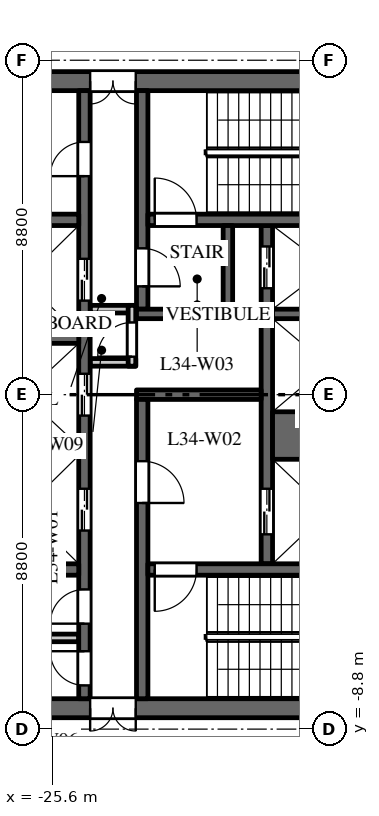
"""IFC4 building model, lengths in metres.
Left out: names, types, materials, properties, quantities, classifications, styles, units other than length and angle.
Written with IfcOpenShell. Run it as: python <this file> out.ifc"""

import sys

from ifc_helpers import new_model, si_unit, direction, frame, frame_2d, origin, place, context, subcontext, project, spatial, rectangle, extrude, element, fill, save


model = new_model("IFC4")
c1 = context("Model", 3, precision=1e-05, world=origin(), true_north=direction((0.0, 1.0)))
c2 = subcontext(c1, "Body", "Model", "MODEL_VIEW")
j1 = project(units=[si_unit("LENGTHUNIT", "METRE"), si_unit("PLANEANGLEUNIT", "RADIAN")], contexts=[c1])
p1 = place(None, origin())
s1 = spatial("IfcSite", under=j1, at=p1, CompositionType="ELEMENT")
p2 = place(p1, origin())
s2 = spatial("IfcBuilding", under=s1, at=p2, CompositionType="ELEMENT")
p3 = place(p2, frame((0.0, 0.0, 150.0)))
s3 = spatial("IfcBuildingStorey", under=s2, at=p3, CompositionType="ELEMENT", Elevation=150.0)
p4 = place(p3, frame((-16.5, 8.25, 0.0), z_axis=(0.0, 0.0, 1.0), x_axis=(-1.0, 0.0, 0.0)))
e1 = element("IfcWall", 1, at=p4, inside=s3, PredefinedType="SHEAR", context=c2, shape_type="SweptSolid", body=[
    extrude(rectangle(XDim=15.0, YDim=0.5, at=frame_2d((7.5, 0.0))), origin(), (0.0, 0.0, 1.0), 3.7),
])
p5 = place(p4, frame((6.9, 0.0, 0.0)))
e2 = element("IfcOpeningElement", 2, at=p5, cuts=e1, PredefinedType="OPENING", context=c2, shape_type="SweptSolid", body=[
    extrude(rectangle(XDim=1.2, YDim=2.1, at=frame_2d((0.6, 1.05))), frame((0.0, 0.26, 0.0), z_axis=(0.0, -1.0, 0.0), x_axis=(1.0, 0.0, 0.0)), (0.0, 0.0, 1.0), 0.52),
])
p6 = place(p4, frame((12.425, 0.0, 0.0)))
e3 = element("IfcOpeningElement", 3, at=p6, cuts=e1, PredefinedType="OPENING", context=c2, shape_type="SweptSolid", body=[
    extrude(rectangle(XDim=0.9, YDim=2.1, at=frame_2d((0.45, 1.05))), frame((0.0, 0.26, 0.0), z_axis=(0.0, -1.0, 0.0), x_axis=(1.0, 0.0, 0.0)), (0.0, 0.0, 1.0), 0.52),
])
p7 = place(p3, frame((-16.5, -8.25, 0.0), z_axis=(0.0, 0.0, 1.0), x_axis=(-1.0, 0.0, 0.0)))
e4 = element("IfcWall", 4, at=p7, inside=s3, PredefinedType="SHEAR", context=c2, shape_type="SweptSolid", body=[
    extrude(rectangle(XDim=15.0, YDim=0.5, at=frame_2d((7.5, 0.0))), origin(), (0.0, 0.0, 1.0), 3.7),
])
p8 = place(p7, frame((6.9, 0.0, 0.0)))
e5 = element("IfcOpeningElement", 5, at=p8, cuts=e4, PredefinedType="OPENING", context=c2, shape_type="SweptSolid", body=[
    extrude(rectangle(XDim=1.2, YDim=2.1, at=frame_2d((0.6, 1.05))), frame((0.0, 0.26, 0.0), z_axis=(0.0, -1.0, 0.0), x_axis=(1.0, 0.0, 0.0)), (0.0, 0.0, 1.0), 0.52),
])
p9 = place(p7, frame((12.275, 0.0, 0.0)))
e6 = element("IfcOpeningElement", 6, at=p9, cuts=e4, PredefinedType="OPENING", context=c2, shape_type="SweptSolid", body=[
    extrude(rectangle(XDim=0.9, YDim=2.1, at=frame_2d((0.45, 1.05))), frame((0.0, 0.26, 0.0), z_axis=(0.0, -1.0, 0.0), x_axis=(1.0, 0.0, 0.0)), (0.0, 0.0, 1.0), 0.52),
])
p10 = place(p3, frame((-19.95, -4.45, 0.0), z_axis=(0.0, 0.0, 1.0), x_axis=(0.0, 1.0, 0.0)))
e7 = element("IfcWall", 7, at=p10, inside=s3, PredefinedType="SHEAR", context=c2, shape_type="SweptSolid", body=[
    extrude(rectangle(XDim=8.9, YDim=0.3, at=frame_2d((4.45, 0.0))), origin(), (0.0, 0.0, 1.0), 3.7),
])
p11 = place(p10, frame((0.775, 0.0, 0.0)))
e8 = element("IfcOpeningElement", 8, at=p11, cuts=e7, PredefinedType="OPENING", context=c2, shape_type="SweptSolid", body=[
    extrude(rectangle(XDim=1.2, YDim=2.1, at=frame_2d((0.6, 1.05))), frame((0.0, 0.16, 0.0), z_axis=(0.0, -1.0, 0.0), x_axis=(1.0, 0.0, 0.0)), (0.0, 0.0, 1.0), 0.32),
])
p12 = place(p10, frame((7.25, 0.0, 0.0)))
e9 = element("IfcOpeningElement", 9, at=p12, cuts=e7, PredefinedType="OPENING", context=c2, shape_type="SweptSolid", body=[
    extrude(rectangle(XDim=1.1, YDim=2.1, at=frame_2d((0.55, 1.05))), frame((0.0, 0.16, 0.0), z_axis=(0.0, -1.0, 0.0), x_axis=(1.0, 0.0, 0.0)), (0.0, 0.0, 1.0), 0.32),
])
p13 = place(p3, frame((-24.75, -8.0, 0.0), z_axis=(0.0, 0.0, 1.0), x_axis=(0.0, 1.0, 0.0)))
e10 = element("IfcWall", 10, at=p13, inside=s3, PredefinedType="SHEAR", context=c2, shape_type="SweptSolid", body=[
    extrude(rectangle(XDim=16.0, YDim=0.3, at=frame_2d((8.0, 0.0))), origin(), (0.0, 0.0, 1.0), 3.7),
])
p14 = place(p13, frame((4.425, 0.0, 0.0)))
e11 = element("IfcOpeningElement", 11, at=p14, cuts=e10, PredefinedType="OPENING", context=c2, shape_type="SweptSolid", body=[
    extrude(rectangle(XDim=1.1, YDim=2.1, at=frame_2d((0.55, 1.05))), frame((0.0, 0.16, 0.0), z_axis=(0.0, -1.0, 0.0), x_axis=(1.0, 0.0, 0.0)), (0.0, 0.0, 1.0), 0.32),
])
p15 = place(p13, frame((7.45, 0.0, 0.0)))
e12 = element("IfcOpeningElement", 12, at=p15, cuts=e10, PredefinedType="OPENING", context=c2, shape_type="SweptSolid", body=[
    extrude(rectangle(XDim=1.1, YDim=2.1, at=frame_2d((0.55, 1.05))), frame((0.0, 0.16, 0.0), z_axis=(0.0, -1.0, 0.0), x_axis=(1.0, 0.0, 0.0)), (0.0, 0.0, 1.0), 0.32),
])
p16 = place(p13, frame((10.475, 0.0, 0.0)))
e13 = element("IfcOpeningElement", 13, at=p16, cuts=e10, PredefinedType="OPENING", context=c2, shape_type="SweptSolid", body=[
    extrude(rectangle(XDim=1.1, YDim=2.1, at=frame_2d((0.55, 1.05))), frame((0.0, 0.16, 0.0), z_axis=(0.0, -1.0, 0.0), x_axis=(1.0, 0.0, 0.0)), (0.0, 0.0, 1.0), 0.32),
])
p17 = place(p13, frame((13.75, 0.0, 0.0)))
e14 = element("IfcOpeningElement", 14, at=p17, cuts=e10, PredefinedType="OPENING", context=c2, shape_type="SweptSolid", body=[
    extrude(rectangle(XDim=0.9, YDim=2.1, at=frame_2d((0.45, 1.05))), frame((0.0, 0.16, 0.0), z_axis=(0.0, -1.0, 0.0), x_axis=(1.0, 0.0, 0.0)), (0.0, 0.0, 1.0), 0.32),
])
p18 = place(p13, frame((1.975, 0.0, 0.0)))
e15 = element("IfcOpeningElement", 15, at=p18, cuts=e10, PredefinedType="OPENING", context=c2, shape_type="SweptSolid", body=[
    extrude(rectangle(XDim=0.9, YDim=2.1, at=frame_2d((0.45, 1.05))), frame((0.0, 0.16, 0.0), z_axis=(0.0, -1.0, 0.0), x_axis=(1.0, 0.0, 0.0)), (0.0, 0.0, 1.0), 0.32),
])
p19 = place(p13, frame((0.35, 0.0, 0.0)))
e16 = element("IfcOpeningElement", 16, at=p19, cuts=e10, PredefinedType="OPENING", context=c2, shape_type="SweptSolid", body=[
    extrude(rectangle(XDim=0.9, YDim=2.1, at=frame_2d((0.45, 1.05))), frame((0.0, 0.16, 0.0), z_axis=(0.0, -1.0, 0.0), x_axis=(1.0, 0.0, 0.0)), (0.0, 0.0, 1.0), 0.32),
])
p20 = place(p3, frame((-20.1, 0.0, 0.0), z_axis=(0.0, 0.0, 1.0), x_axis=(-1.0, 0.0, 0.0)))
e17 = element("IfcWall", 17, at=p20, inside=s3, PredefinedType="SHEAR", context=c2, shape_type="SweptSolid", body=[
    extrude(rectangle(XDim=3.28, YDim=0.25, at=frame_2d((1.64, 0.0))), origin(), (0.0, 0.0, 1.0), 3.7),
])
for number, where, z_axis, x_axis in (
    (18, (-23.4, 0.85, 0.0), (0.0, 0.0, 1.0), (-1.0, 0.0, 0.0)),
    (19, (-23.4, 2.25, 0.0), (0.0, 0.0, 1.0), (-1.0, 0.0, 0.0)),
):
    element("IfcWall", number, at=place(p3, frame(where, z_axis=z_axis, x_axis=x_axis)), inside=s3, PredefinedType="PARTITIONING", context=c2, shape_type="SweptSolid", body=[
        extrude(rectangle(XDim=1.2, YDim=0.2, at=frame_2d((0.6, 0.0))), origin(), (0.0, 0.0, 1.0), 3.7),
    ])
p21 = place(p3, frame((-23.5, 0.75, 0.0), z_axis=(0.0, 0.0, 1.0), x_axis=(0.0, 1.0, 0.0)))
e20 = element("IfcWall", 20, at=p21, inside=s3, PredefinedType="PARTITIONING", context=c2, shape_type="SweptSolid", body=[
    extrude(rectangle(XDim=1.6, YDim=0.2, at=frame_2d((0.8, 0.0))), origin(), (0.0, 0.0, 1.0), 3.7),
])
p22 = place(p21, frame((0.25, 0.0, 0.0)))
e21 = element("IfcOpeningElement", 21, at=p22, cuts=e20, PredefinedType="OPENING", context=c2, shape_type="SweptSolid", body=[
    extrude(rectangle(XDim=0.9, YDim=2.1, at=frame_2d((0.45, 1.05))), frame((0.0, 0.11, 0.0), z_axis=(0.0, -1.0, 0.0), x_axis=(1.0, 0.0, 0.0)), (0.0, 0.0, 1.0), 0.22),
])
p23 = place(p3, frame((-24.9, 4.6, 0.0), z_axis=(0.0, 0.0, 1.0), x_axis=(-1.0, 0.0, 0.0)))
e22 = element("IfcWall", 22, at=p23, inside=s3, PredefinedType="SHEAR", context=c2, shape_type="SweptSolid", body=[
    extrude(rectangle(XDim=6.1, YDim=0.3, at=frame_2d((3.05, 0.0))), origin(), (0.0, 0.0, 1.0), 3.7),
])
p24 = place(p23, frame((4.2, 0.0, 0.0)))
e23 = element("IfcOpeningElement", 23, at=p24, cuts=e22, PredefinedType="OPENING", context=c2, shape_type="SweptSolid", body=[
    extrude(rectangle(XDim=0.9, YDim=2.1, at=frame_2d((0.45, 1.05))), frame((0.0, 0.16, 0.0), z_axis=(0.0, -1.0, 0.0), x_axis=(1.0, 0.0, 0.0)), (0.0, 0.0, 1.0), 0.32),
])
p25 = place(p3, frame((-24.9, -6.4, 0.0), z_axis=(0.0, 0.0, 1.0), x_axis=(-1.0, 0.0, 0.0)))
e24 = element("IfcWall", 24, at=p25, inside=s3, PredefinedType="PARTITIONING", context=c2, shape_type="SweptSolid", body=[
    extrude(rectangle(XDim=2.35, YDim=0.2, at=frame_2d((1.175, 0.0))), origin(), (0.0, 0.0, 1.0), 3.7),
])
p26 = place(p3, frame((-24.9, -4.6, 0.0), z_axis=(0.0, 0.0, 1.0), x_axis=(-1.0, 0.0, 0.0)))
e25 = element("IfcWall", 25, at=p26, inside=s3, PredefinedType="SHEAR", context=c2, shape_type="SweptSolid", body=[
    extrude(rectangle(XDim=6.1, YDim=0.3, at=frame_2d((3.05, 0.0))), origin(), (0.0, 0.0, 1.0), 3.7),
])
p27 = place(p3, frame((-16.9, -1.075, 0.0), z_axis=(0.0, 0.0, 1.0), x_axis=(-1.0, 0.0, 0.0)))
e26 = element("IfcWall", 26, at=p27, inside=s3, PredefinedType="SHEAR", context=c2, shape_type="SweptSolid", body=[
    extrude(rectangle(XDim=2.9, YDim=1.25, at=frame_2d((1.45, 0.0))), origin(), (0.0, 0.0, 1.0), 3.7),
])
for number, where, z_axis, x_axis in (
    (27, (-16.9, 2.125, 0.0), (0.0, 0.0, 1.0), (-1.0, 0.0, 0.0)),
    (28, (-24.9, -1.475, 0.0), (0.0, 0.0, 1.0), (-1.0, 0.0, 0.0)),
    (29, (-24.9, 1.475, 0.0), (0.0, 0.0, 1.0), (-1.0, 0.0, 0.0)),
):
    element("IfcWall", number, at=place(p3, frame(where, z_axis=z_axis, x_axis=x_axis)), inside=s3, PredefinedType="SHEAR", context=c2, shape_type="SweptSolid", body=[
        extrude(rectangle(XDim=2.9, YDim=0.25, at=frame_2d((1.45, 0.0))), origin(), (0.0, 0.0, 1.0), 3.7),
    ])
p28 = place(p3, frame((-23.23, 2.25, 0.0), z_axis=(0.0, 0.0, 1.0), x_axis=(0.0, 1.0, 0.0)))
e30 = element("IfcWall", 30, at=p28, inside=s3, PredefinedType="SHEAR", context=c2, shape_type="SweptSolid", body=[
    extrude(rectangle(XDim=5.75, YDim=0.3, at=frame_2d((2.875, 0.0))), origin(), (0.0, 0.0, 1.0), 3.7),
])
p29 = place(p28, frame((0.6, 0.0, 0.0)))
e31 = element("IfcOpeningElement", 31, at=p29, cuts=e30, PredefinedType="OPENING", context=c2, shape_type="SweptSolid", body=[
    extrude(rectangle(XDim=1.0, YDim=2.1, at=frame_2d((0.5, 1.05))), frame((0.0, 0.16, 0.0), z_axis=(0.0, -1.0, 0.0), x_axis=(1.0, 0.0, 0.0)), (0.0, 0.0, 1.0), 0.32),
])
p30 = place(p3, frame((-23.23, -8.0, 0.0), z_axis=(0.0, 0.0, 1.0), x_axis=(0.0, 1.0, 0.0)))
e32 = element("IfcWall", 32, at=p30, inside=s3, PredefinedType="SHEAR", context=c2, shape_type="SweptSolid", body=[
    extrude(rectangle(XDim=7.875, YDim=0.3, at=frame_2d((3.938, 0.0))), origin(), (0.0, 0.0, 1.0), 3.7),
])
p31 = place(p30, frame((5.15, 0.0, 0.0)))
e33 = element("IfcOpeningElement", 33, at=p31, cuts=e32, PredefinedType="OPENING", context=c2, shape_type="SweptSolid", body=[
    extrude(rectangle(XDim=1.1, YDim=2.1, at=frame_2d((0.55, 1.05))), frame((0.0, 0.16, 0.0), z_axis=(0.0, -1.0, 0.0), x_axis=(1.0, 0.0, 0.0)), (0.0, 0.0, 1.0), 0.32),
])
p32 = place(p3, frame((-16.9, 4.6, 0.0), z_axis=(0.0, 0.0, 1.0), x_axis=(-1.0, 0.0, 0.0)))
e34 = element("IfcWall", 34, at=p32, inside=s3, PredefinedType="SHEAR", context=c2, shape_type="SweptSolid", body=[
    extrude(rectangle(XDim=6.18, YDim=0.3, at=frame_2d((3.09, 0.0))), origin(), (0.0, 0.0, 1.0), 3.7),
])
p33 = place(p32, frame((4.9, 0.0, 0.0)))
e35 = element("IfcOpeningElement", 35, at=p33, cuts=e34, PredefinedType="OPENING", context=c2, shape_type="SweptSolid", body=[
    extrude(rectangle(XDim=1.1, YDim=2.1, at=frame_2d((0.55, 1.05))), frame((0.0, 0.16, 0.0), z_axis=(0.0, -1.0, 0.0), x_axis=(1.0, 0.0, 0.0)), (0.0, 0.0, 1.0), 0.32),
])
p34 = place(p3, frame((-16.9, -4.6, 0.0), z_axis=(0.0, 0.0, 1.0), x_axis=(-1.0, 0.0, 0.0)))
e36 = element("IfcWall", 36, at=p34, inside=s3, PredefinedType="SHEAR", context=c2, shape_type="SweptSolid", body=[
    extrude(rectangle(XDim=6.18, YDim=0.3, at=frame_2d((3.09, 0.0))), origin(), (0.0, 0.0, 1.0), 3.7),
])
p35 = place(p34, frame((4.9, 0.0, 0.0)))
e37 = element("IfcOpeningElement", 37, at=p35, cuts=e36, PredefinedType="OPENING", context=c2, shape_type="SweptSolid", body=[
    extrude(rectangle(XDim=1.1, YDim=2.1, at=frame_2d((0.55, 1.05))), frame((0.0, 0.16, 0.0), z_axis=(0.0, -1.0, 0.0), x_axis=(1.0, 0.0, 0.0)), (0.0, 0.0, 1.0), 0.32),
])
p36 = place(p3, frame((-20.85, 2.125, 0.0), z_axis=(0.0, 0.0, 1.0), x_axis=(-1.0, 0.0, 0.0)))
e38 = element("IfcWall", 38, at=p36, inside=s3, PredefinedType="SHEAR", context=c2, shape_type="SweptSolid", body=[
    extrude(rectangle(XDim=2.53, YDim=0.25, at=frame_2d((1.265, 0.0))), origin(), (0.0, 0.0, 1.0), 3.7),
])
p37 = place(p3, frame((-20.975, 2.25, 0.0), z_axis=(0.0, 0.0, 1.0), x_axis=(0.0, 1.0, 0.0)))
e39 = element("IfcWall", 39, at=p37, inside=s3, PredefinedType="SHEAR", context=c2, shape_type="SweptSolid", body=[
    extrude(rectangle(XDim=2.2, YDim=0.25, at=frame_2d((1.1, 0.0))), origin(), (0.0, 0.0, 1.0), 3.7),
])
p38 = place(p11, origin())
e40 = element("IfcDoor", 40, at=p38, inside=s3, OperationType="DOUBLE_DOOR_SLIDING", PredefinedType="DOOR", context=c2, shape_type="SweptSolid", body=[
    extrude(rectangle(XDim=1.2, YDim=2.1, at=frame_2d((0.6, 1.05))), frame((0.0, 0.025, 0.0), z_axis=(0.0, -1.0, 0.0), x_axis=(1.0, 0.0, 0.0)), (0.0, 0.0, 1.0), 0.05),
])
fill(e8, e40)
p39 = place(p12, origin())
e41 = element("IfcDoor", 41, at=p39, inside=s3, OperationType="DOUBLE_DOOR_SLIDING", PredefinedType="DOOR", context=c2, shape_type="SweptSolid", body=[
    extrude(rectangle(XDim=1.1, YDim=2.1, at=frame_2d((0.55, 1.05))), frame((0.0, 0.025, 0.0), z_axis=(0.0, -1.0, 0.0), x_axis=(1.0, 0.0, 0.0)), (0.0, 0.0, 1.0), 0.05),
])
fill(e9, e41)
p40 = place(p14, origin())
e42 = element("IfcDoor", 42, at=p40, inside=s3, OperationType="DOUBLE_DOOR_SLIDING", PredefinedType="DOOR", context=c2, shape_type="SweptSolid", body=[
    extrude(rectangle(XDim=1.1, YDim=2.1, at=frame_2d((0.55, 1.05))), frame((0.0, 0.025, 0.0), z_axis=(0.0, -1.0, 0.0), x_axis=(1.0, 0.0, 0.0)), (0.0, 0.0, 1.0), 0.05),
])
fill(e11, e42)
p41 = place(p15, origin())
e43 = element("IfcDoor", 43, at=p41, inside=s3, OperationType="DOUBLE_DOOR_SLIDING", PredefinedType="DOOR", context=c2, shape_type="SweptSolid", body=[
    extrude(rectangle(XDim=1.1, YDim=2.1, at=frame_2d((0.55, 1.05))), frame((0.0, 0.025, 0.0), z_axis=(0.0, -1.0, 0.0), x_axis=(1.0, 0.0, 0.0)), (0.0, 0.0, 1.0), 0.05),
])
fill(e12, e43)
p42 = place(p16, origin())
e44 = element("IfcDoor", 44, at=p42, inside=s3, OperationType="DOUBLE_DOOR_SLIDING", PredefinedType="DOOR", context=c2, shape_type="SweptSolid", body=[
    extrude(rectangle(XDim=1.1, YDim=2.1, at=frame_2d((0.55, 1.05))), frame((0.0, 0.025, 0.0), z_axis=(0.0, -1.0, 0.0), x_axis=(1.0, 0.0, 0.0)), (0.0, 0.0, 1.0), 0.05),
])
fill(e13, e44)
p43 = place(p33, origin())
e45 = element("IfcDoor", 45, at=p43, inside=s3, OperationType="SINGLE_SWING_RIGHT", PredefinedType="DOOR", context=c2, shape_type="SweptSolid", body=[
    extrude(rectangle(XDim=1.1, YDim=2.1, at=frame_2d((0.55, 1.05))), frame((0.0, 0.025, 0.0), z_axis=(0.0, -1.0, 0.0), x_axis=(1.0, 0.0, 0.0)), (0.0, 0.0, 1.0), 0.05),
])
fill(e35, e45)
p44 = place(p35, origin())
e46 = element("IfcDoor", 46, at=p44, inside=s3, OperationType="SINGLE_SWING_LEFT", PredefinedType="DOOR", context=c2, shape_type="SweptSolid", body=[
    extrude(rectangle(XDim=1.1, YDim=2.1, at=frame_2d((0.55, 1.05))), frame((0.0, 0.025, 0.0), z_axis=(0.0, -1.0, 0.0), x_axis=(1.0, 0.0, 0.0)), (0.0, 0.0, 1.0), 0.05),
])
fill(e37, e46)
p45 = place(p31, origin())
e47 = element("IfcDoor", 47, at=p45, inside=s3, OperationType="SINGLE_SWING_LEFT", PredefinedType="DOOR", context=c2, shape_type="SweptSolid", body=[
    extrude(rectangle(XDim=1.1, YDim=2.1, at=frame_2d((0.55, 1.05))), frame((0.0, 0.025, 0.0), z_axis=(0.0, -1.0, 0.0), x_axis=(1.0, 0.0, 0.0)), (0.0, 0.0, 1.0), 0.05),
])
fill(e33, e47)
p46 = place(p29, origin())
e48 = element("IfcDoor", 48, at=p46, inside=s3, OperationType="SINGLE_SWING_LEFT", PredefinedType="DOOR", context=c2, shape_type="SweptSolid", body=[
    extrude(rectangle(XDim=1.0, YDim=2.1, at=frame_2d((0.5, 1.05))), frame((0.0, 0.025, 0.0), z_axis=(0.0, -1.0, 0.0), x_axis=(1.0, 0.0, 0.0)), (0.0, 0.0, 1.0), 0.05),
])
fill(e31, e48)
p47 = place(p5, origin())
e49 = element("IfcDoor", 49, at=p47, inside=s3, OperationType="DOUBLE_DOOR_DOUBLE_SWING", PredefinedType="DOOR", context=c2, shape_type="SweptSolid", body=[
    extrude(rectangle(XDim=1.2, YDim=2.1, at=frame_2d((0.6, 1.05))), frame((0.0, 0.025, 0.0), z_axis=(0.0, -1.0, 0.0), x_axis=(1.0, 0.0, 0.0)), (0.0, 0.0, 1.0), 0.05),
])
fill(e2, e49)
p48 = place(p8, origin())
e50 = element("IfcDoor", 50, at=p48, inside=s3, OperationType="DOUBLE_DOOR_DOUBLE_SWING", PredefinedType="DOOR", context=c2, shape_type="SweptSolid", body=[
    extrude(rectangle(XDim=1.2, YDim=2.1, at=frame_2d((0.6, 1.05))), frame((0.0, 0.025, 0.0), z_axis=(0.0, -1.0, 0.0), x_axis=(1.0, 0.0, 0.0)), (0.0, 0.0, 1.0), 0.05),
])
fill(e5, e50)
p49 = place(p17, origin())
e51 = element("IfcDoor", 51, at=p49, inside=s3, OperationType="SINGLE_SWING_RIGHT", PredefinedType="DOOR", context=c2, shape_type="SweptSolid", body=[
    extrude(rectangle(XDim=0.9, YDim=2.1, at=frame_2d((0.45, 1.05))), frame((0.0, 0.025, 0.0), z_axis=(0.0, -1.0, 0.0), x_axis=(1.0, 0.0, 0.0)), (0.0, 0.0, 1.0), 0.05),
])
fill(e14, e51)
p50 = place(p18, origin())
e52 = element("IfcDoor", 52, at=p50, inside=s3, OperationType="SINGLE_SWING_RIGHT", PredefinedType="DOOR", context=c2, shape_type="SweptSolid", body=[
    extrude(rectangle(XDim=0.9, YDim=2.1, at=frame_2d((0.45, 1.05))), frame((0.0, 0.025, 0.0), z_axis=(0.0, -1.0, 0.0), x_axis=(1.0, 0.0, 0.0)), (0.0, 0.0, 1.0), 0.05),
])
fill(e15, e52)
p51 = place(p19, origin())
e53 = element("IfcDoor", 53, at=p51, inside=s3, OperationType="SINGLE_SWING_LEFT", PredefinedType="DOOR", context=c2, shape_type="SweptSolid", body=[
    extrude(rectangle(XDim=0.9, YDim=2.1, at=frame_2d((0.45, 1.05))), frame((0.0, 0.025, 0.0), z_axis=(0.0, -1.0, 0.0), x_axis=(1.0, 0.0, 0.0)), (0.0, 0.0, 1.0), 0.05),
])
fill(e16, e53)
p52 = place(p22, origin())
e54 = element("IfcDoor", 54, at=p52, inside=s3, OperationType="SINGLE_SWING_RIGHT", PredefinedType="DOOR", context=c2, shape_type="SweptSolid", body=[
    extrude(rectangle(XDim=0.9, YDim=2.1, at=frame_2d((0.45, 1.05))), frame((0.0, 0.025, 0.0), z_axis=(0.0, -1.0, 0.0), x_axis=(1.0, 0.0, 0.0)), (0.0, 0.0, 1.0), 0.05),
])
fill(e21, e54)
save(model, sys.argv[1])
